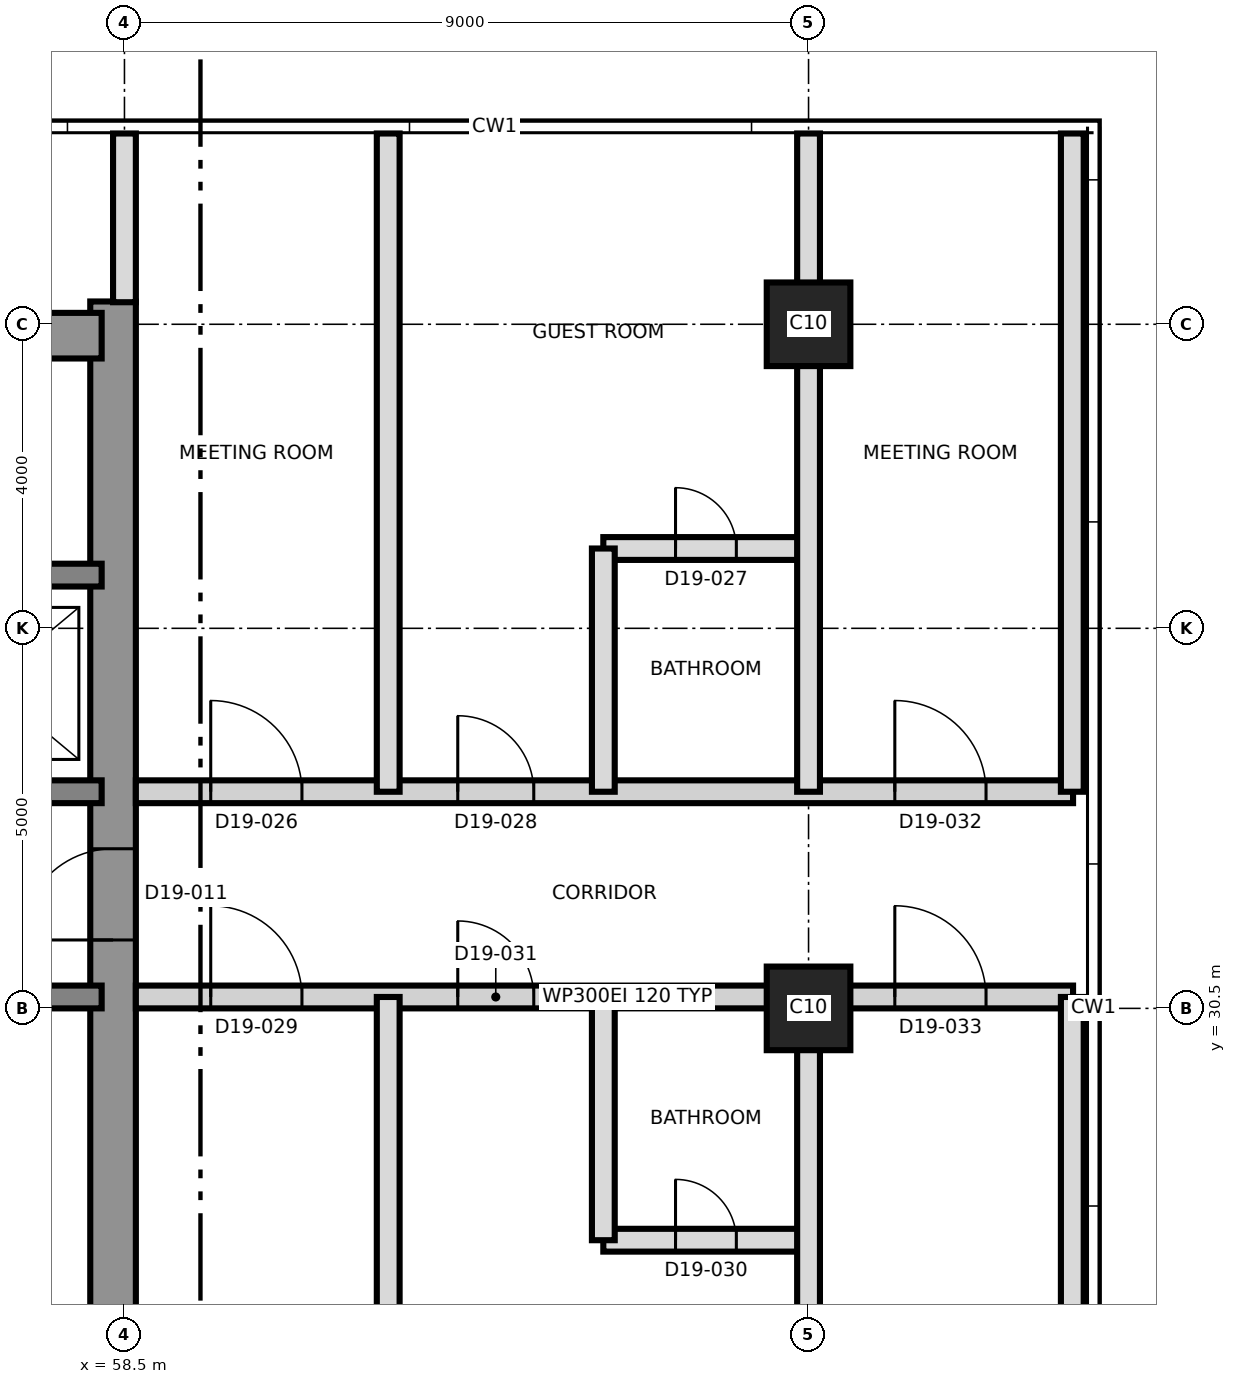
"""IFC4 building model, lengths in metres.
Left out: names, types, materials, properties, quantities, classifications, styles, units other than length and angle.
Written with IfcOpenShell. Run it as: python <this file> out.ifc"""

import sys

from ifc_helpers import new_model, si_unit, direction, frame, frame_2d, origin, origin_2d, place, context, subcontext, project, spatial, rectangle, extrude, element, fill, save


model = new_model("IFC4")
c1 = context("Model", 3, precision=1e-05, world=origin(), true_north=direction((0.0, 1.0)))
c2 = subcontext(c1, "Body", "Model", "MODEL_VIEW")
j1 = project(units=[si_unit("LENGTHUNIT", "METRE"), si_unit("PLANEANGLEUNIT", "RADIAN")], contexts=[c1])
p1 = place(None, origin())
s1 = spatial("IfcSite", under=j1, at=p1, CompositionType="ELEMENT")
p2 = place(p1, origin())
s2 = spatial("IfcBuilding", under=s1, at=p2, CompositionType="ELEMENT")
p3 = place(p2, frame((0.0, 0.0, 179.2)))
s3 = spatial("IfcBuildingStorey", under=s2, at=p3, CompositionType="ELEMENT", Elevation=179.2)
p4 = place(p3, frame((58.35, 21.2, 0.0), z_axis=(0.0, 0.0, 1.0), x_axis=(0.0, 1.0, 0.0)))
e1 = element("IfcWall", 1, at=p4, inside=s3, PredefinedType="SHEAR", context=c2, shape_type="SweptSolid", body=[
    extrude(rectangle(XDim=18.6, YDim=0.6, at=frame_2d((9.3, 0.0))), origin(), (0.0, 0.0, 1.0), 3.7),
])
p5 = place(p4, frame((10.2, 0.0, 0.0)))
e2 = element("IfcOpeningElement", 2, at=p5, cuts=e1, PredefinedType="OPENING", context=c2, shape_type="SweptSolid", body=[
    extrude(rectangle(XDim=1.2, YDim=2.1, at=frame_2d((0.6, 1.05))), frame((0.0, 0.31, 0.0), z_axis=(0.0, -1.0, 0.0), x_axis=(1.0, 0.0, 0.0)), (0.0, 0.0, 1.0), 0.62),
])
p6 = place(p3, frame((31.2, 39.35, 0.0), z_axis=(0.0, 0.0, 1.0), x_axis=(1.0, 0.0, 0.0)))
e3 = element("IfcWall", 3, at=p6, inside=s3, PredefinedType="SHEAR", context=c2, shape_type="SweptSolid", body=[
    extrude(rectangle(XDim=27.0, YDim=0.6, at=frame_2d((13.5, 0.0))), origin(), (0.0, 0.0, 1.0), 3.7),
])
p7 = place(p6, frame((10.5, 0.0, 0.0)))
e4 = element("IfcOpeningElement", 4, at=p7, cuts=e3, PredefinedType="OPENING", context=c2, shape_type="SweptSolid", body=[
    extrude(rectangle(XDim=1.2, YDim=2.1, at=frame_2d((0.6, 1.05))), frame((0.0, 0.31, 0.0), z_axis=(0.0, -1.0, 0.0), x_axis=(1.0, 0.0, 0.0)), (0.0, 0.0, 1.0), 0.62),
])
p8 = place(p3, frame((31.8, 30.65, 0.0), z_axis=(0.0, 0.0, 1.0), x_axis=(1.0, 0.0, 0.0)))
e5 = element("IfcWall", 5, at=p8, inside=s3, PredefinedType="SHEAR", context=c2, shape_type="SweptSolid", body=[
    extrude(rectangle(XDim=26.4, YDim=0.3, at=frame_2d((13.2, 0.0))), origin(), (0.0, 0.0, 1.0), 3.7),
])
p9 = place(p8, frame((24.7, 0.0, 0.0)))
e6 = element("IfcOpeningElement", 6, at=p9, cuts=e5, PredefinedType="OPENING", context=c2, shape_type="SweptSolid", body=[
    extrude(rectangle(XDim=1.0, YDim=2.1, at=frame_2d((0.5, 1.05))), frame((0.0, 0.16, 0.0), z_axis=(0.0, -1.0, 0.0), x_axis=(1.0, 0.0, 0.0)), (0.0, 0.0, 1.0), 0.32),
])
p10 = place(p8, frame((4.0, 0.0, 0.0)))
e7 = element("IfcOpeningElement", 7, at=p10, cuts=e5, PredefinedType="OPENING", context=c2, shape_type="SweptSolid", body=[
    extrude(rectangle(XDim=1.0, YDim=2.1, at=frame_2d((0.5, 1.05))), frame((0.0, 0.16, 0.0), z_axis=(0.0, -1.0, 0.0), x_axis=(1.0, 0.0, 0.0)), (0.0, 0.0, 1.0), 0.32),
])
p11 = place(p3, frame((31.8, 33.35, 0.0), z_axis=(0.0, 0.0, 1.0), x_axis=(1.0, 0.0, 0.0)))
e8 = element("IfcWall", 8, at=p11, inside=s3, PredefinedType="SHEAR", context=c2, shape_type="SweptSolid", body=[
    extrude(rectangle(XDim=26.4, YDim=0.3, at=frame_2d((13.2, 0.0))), origin(), (0.0, 0.0, 1.0), 3.7),
])
p12 = place(p11, frame((13.85, 0.0, 0.0)))
e9 = element("IfcOpeningElement", 9, at=p12, cuts=e8, PredefinedType="OPENING", context=c2, shape_type="SweptSolid", body=[
    extrude(rectangle(XDim=1.4, YDim=2.1, at=frame_2d((0.7, 1.05))), frame((0.0, 0.16, 0.0), z_axis=(0.0, -1.0, 0.0), x_axis=(1.0, 0.0, 0.0)), (0.0, 0.0, 1.0), 0.32),
])
p13 = place(p11, frame((5.325, 0.0, 0.0)))
e10 = element("IfcOpeningElement", 10, at=p13, cuts=e8, PredefinedType="OPENING", context=c2, shape_type="SweptSolid", body=[
    extrude(rectangle(XDim=1.2, YDim=2.1, at=frame_2d((0.6, 1.05))), frame((0.0, 0.16, 0.0), z_axis=(0.0, -1.0, 0.0), x_axis=(1.0, 0.0, 0.0)), (0.0, 0.0, 1.0), 0.32),
])
p14 = place(p11, frame((19.875, 0.0, 0.0)))
e11 = element("IfcOpeningElement", 11, at=p14, cuts=e8, PredefinedType="OPENING", context=c2, shape_type="SweptSolid", body=[
    extrude(rectangle(XDim=1.2, YDim=2.1, at=frame_2d((0.6, 1.05))), frame((0.0, 0.16, 0.0), z_axis=(0.0, -1.0, 0.0), x_axis=(1.0, 0.0, 0.0)), (0.0, 0.0, 1.0), 0.32),
])
p15 = place(p3, frame((43.5, 36.2, 0.0), z_axis=(0.0, 0.0, 1.0), x_axis=(1.0, 0.0, 0.0)))
e12 = element("IfcWall", 12, at=p15, inside=s3, PredefinedType="SHEAR", context=c2, shape_type="SweptSolid", body=[
    extrude(rectangle(XDim=14.7, YDim=0.3, at=frame_2d((7.35, 0.0))), origin(), (0.0, 0.0, 1.0), 3.7),
])
p16 = place(p15, frame((6.9, 0.0, 0.0)))
e13 = element("IfcOpeningElement", 13, at=p16, cuts=e12, PredefinedType="OPENING", context=c2, shape_type="SweptSolid", body=[
    extrude(rectangle(XDim=1.2, YDim=2.1, at=frame_2d((0.6, 1.05))), frame((0.0, 0.16, 0.0), z_axis=(0.0, -1.0, 0.0), x_axis=(1.0, 0.0, 0.0)), (0.0, 0.0, 1.0), 0.32),
])
p17 = place(p15, frame((0.7, 0.0, 0.0)))
e14 = element("IfcOpeningElement", 14, at=p17, cuts=e12, PredefinedType="OPENING", context=c2, shape_type="SweptSolid", body=[
    extrude(rectangle(XDim=1.3, YDim=2.4, at=frame_2d((0.65, 1.2))), frame((0.0, 0.16, 0.0), z_axis=(0.0, -1.0, 0.0), x_axis=(1.0, 0.0, 0.0)), (0.0, 0.0, 1.0), 0.32),
])
p18 = place(p15, frame((3.7, 0.0, 0.0)))
e15 = element("IfcOpeningElement", 15, at=p18, cuts=e12, PredefinedType="OPENING", context=c2, shape_type="SweptSolid", body=[
    extrude(rectangle(XDim=1.3, YDim=2.4, at=frame_2d((0.65, 1.2))), frame((0.0, 0.16, 0.0), z_axis=(0.0, -1.0, 0.0), x_axis=(1.0, 0.0, 0.0)), (0.0, 0.0, 1.0), 0.32),
])
for number, where, z_axis, x_axis in (
    (16, (67.5, 30.5, 0.0), (0.0, 0.0, 1.0), (1.0, 0.0, 0.0)),
    (17, (67.5, 39.5, 0.0), (0.0, 0.0, 1.0), (1.0, 0.0, 0.0)),
):
    element("IfcColumn", number, at=place(p3, frame(where, z_axis=z_axis, x_axis=x_axis)), inside=s3, PredefinedType="COLUMN", context=c2, shape_type="SweptSolid", body=[
        extrude(rectangle(XDim=1.1, YDim=1.1, at=origin_2d()), origin(), (0.0, 0.0, 1.0), 3.7),
    ])
p19 = place(p3, frame((64.8, 27.45, 0.0), z_axis=(0.0, 0.0, 1.0), x_axis=(1.0, 0.0, 0.0)))
e18 = element("IfcWall", 18, at=p19, inside=s3, PredefinedType="PARTITIONING", context=c2, shape_type="SweptSolid", body=[
    extrude(rectangle(XDim=2.7, YDim=0.3, at=frame_2d((1.35, 0.0))), origin(), (0.0, 0.0, 1.0), 3.4),
])
p20 = place(p19, frame((0.95, 0.0, 0.0)))
e19 = element("IfcOpeningElement", 19, at=p20, cuts=e18, PredefinedType="OPENING", context=c2, shape_type="SweptSolid", body=[
    extrude(rectangle(XDim=0.8, YDim=2.1, at=frame_2d((0.4, 1.05))), frame((0.0, 0.16, 0.0), z_axis=(0.0, -1.0, 0.0), x_axis=(1.0, 0.0, 0.0)), (0.0, 0.0, 1.0), 0.32),
])
p21 = place(p3, frame((58.65, 30.65, 0.0), z_axis=(0.0, 0.0, 1.0), x_axis=(1.0, 0.0, 0.0)))
e20 = element("IfcWall", 20, at=p21, inside=s3, PredefinedType="PARTITIONING", context=c2, shape_type="SweptSolid", body=[
    extrude(rectangle(XDim=12.33, YDim=0.3, at=frame_2d((6.165, 0.0))), origin(), (0.0, 0.0, 1.0), 3.4),
])
p22 = place(p21, frame((0.985, 0.0, 0.0)))
e21 = element("IfcOpeningElement", 21, at=p22, cuts=e20, PredefinedType="OPENING", context=c2, shape_type="SweptSolid", body=[
    extrude(rectangle(XDim=1.2, YDim=2.1, at=frame_2d((0.6, 1.05))), frame((0.0, 0.16, 0.0), z_axis=(0.0, -1.0, 0.0), x_axis=(1.0, 0.0, 0.0)), (0.0, 0.0, 1.0), 0.32),
])
p23 = place(p21, frame((4.235, 0.0, 0.0)))
e22 = element("IfcOpeningElement", 22, at=p23, cuts=e20, PredefinedType="OPENING", context=c2, shape_type="SweptSolid", body=[
    extrude(rectangle(XDim=1.0, YDim=2.1, at=frame_2d((0.5, 1.05))), frame((0.0, 0.16, 0.0), z_axis=(0.0, -1.0, 0.0), x_axis=(1.0, 0.0, 0.0)), (0.0, 0.0, 1.0), 0.32),
])
p24 = place(p21, frame((9.985, 0.0, 0.0)))
e23 = element("IfcOpeningElement", 23, at=p24, cuts=e20, PredefinedType="OPENING", context=c2, shape_type="SweptSolid", body=[
    extrude(rectangle(XDim=1.2, YDim=2.1, at=frame_2d((0.6, 1.05))), frame((0.0, 0.16, 0.0), z_axis=(0.0, -1.0, 0.0), x_axis=(1.0, 0.0, 0.0)), (0.0, 0.0, 1.0), 0.32),
])
p25 = place(p3, frame((58.65, 33.35, 0.0), z_axis=(0.0, 0.0, 1.0), x_axis=(1.0, 0.0, 0.0)))
e24 = element("IfcWall", 24, at=p25, inside=s3, PredefinedType="PARTITIONING", context=c2, shape_type="SweptSolid", body=[
    extrude(rectangle(XDim=12.33, YDim=0.3, at=frame_2d((6.165, 0.0))), origin(), (0.0, 0.0, 1.0), 3.4),
])
p26 = place(p25, frame((0.985, 0.0, 0.0)))
e25 = element("IfcOpeningElement", 25, at=p26, cuts=e24, PredefinedType="OPENING", context=c2, shape_type="SweptSolid", body=[
    extrude(rectangle(XDim=1.2, YDim=2.1, at=frame_2d((0.6, 1.05))), frame((0.0, 0.16, 0.0), z_axis=(0.0, -1.0, 0.0), x_axis=(1.0, 0.0, 0.0)), (0.0, 0.0, 1.0), 0.32),
])
p27 = place(p25, frame((4.235, 0.0, 0.0)))
e26 = element("IfcOpeningElement", 26, at=p27, cuts=e24, PredefinedType="OPENING", context=c2, shape_type="SweptSolid", body=[
    extrude(rectangle(XDim=1.0, YDim=2.1, at=frame_2d((0.5, 1.05))), frame((0.0, 0.16, 0.0), z_axis=(0.0, -1.0, 0.0), x_axis=(1.0, 0.0, 0.0)), (0.0, 0.0, 1.0), 0.32),
])
p28 = place(p25, frame((9.985, 0.0, 0.0)))
e27 = element("IfcOpeningElement", 27, at=p28, cuts=e24, PredefinedType="OPENING", context=c2, shape_type="SweptSolid", body=[
    extrude(rectangle(XDim=1.2, YDim=2.1, at=frame_2d((0.6, 1.05))), frame((0.0, 0.16, 0.0), z_axis=(0.0, -1.0, 0.0), x_axis=(1.0, 0.0, 0.0)), (0.0, 0.0, 1.0), 0.32),
])
p29 = place(p3, frame((64.8, 36.55, 0.0), z_axis=(0.0, 0.0, 1.0), x_axis=(1.0, 0.0, 0.0)))
e28 = element("IfcWall", 28, at=p29, inside=s3, PredefinedType="PARTITIONING", context=c2, shape_type="SweptSolid", body=[
    extrude(rectangle(XDim=2.7, YDim=0.3, at=frame_2d((1.35, 0.0))), origin(), (0.0, 0.0, 1.0), 3.4),
])
p30 = place(p29, frame((0.95, 0.0, 0.0)))
e29 = element("IfcOpeningElement", 29, at=p30, cuts=e28, PredefinedType="OPENING", context=c2, shape_type="SweptSolid", body=[
    extrude(rectangle(XDim=0.8, YDim=2.1, at=frame_2d((0.4, 1.05))), frame((0.0, 0.16, 0.0), z_axis=(0.0, -1.0, 0.0), x_axis=(1.0, 0.0, 0.0)), (0.0, 0.0, 1.0), 0.32),
])
p31 = place(p3, frame((58.5, 39.79, 0.0), z_axis=(0.0, 0.0, 1.0), x_axis=(0.0, 1.0, 0.0)))
e30 = element("IfcWall", 30, at=p31, inside=s3, PredefinedType="PARTITIONING", context=c2, shape_type="SweptSolid", body=[
    extrude(rectangle(XDim=2.22, YDim=0.3, at=frame_2d((1.11, 0.0))), origin(), (0.0, 0.0, 1.0), 3.4),
])
p32 = place(p3, frame((61.97, 19.17, 0.0), z_axis=(0.0, 0.0, 1.0), x_axis=(0.0, 1.0, 0.0)))
e31 = element("IfcWall", 31, at=p32, inside=s3, PredefinedType="PARTITIONING", context=c2, shape_type="SweptSolid", body=[
    extrude(rectangle(XDim=11.48, YDim=0.3, at=frame_2d((5.74, 0.0))), origin(), (0.0, 0.0, 1.0), 3.4),
])
p33 = place(p3, frame((61.97, 33.35, 0.0), z_axis=(0.0, 0.0, 1.0), x_axis=(0.0, 1.0, 0.0)))
e32 = element("IfcWall", 32, at=p33, inside=s3, PredefinedType="PARTITIONING", context=c2, shape_type="SweptSolid", body=[
    extrude(rectangle(XDim=8.66, YDim=0.3, at=frame_2d((4.33, 0.0))), origin(), (0.0, 0.0, 1.0), 3.4),
])
for number, where, z_axis, x_axis in (
    (33, (64.8, 27.45, 0.0), (0.0, 0.0, 1.0), (0.0, 1.0, 0.0)),
    (34, (64.8, 33.35, 0.0), (0.0, 0.0, 1.0), (0.0, 1.0, 0.0)),
):
    element("IfcWall", number, at=place(p3, frame(where, z_axis=z_axis, x_axis=x_axis)), inside=s3, PredefinedType="PARTITIONING", context=c2, shape_type="SweptSolid", body=[
        extrude(rectangle(XDim=3.2, YDim=0.3, at=frame_2d((1.6, 0.0))), origin(), (0.0, 0.0, 1.0), 3.4),
    ])
p34 = place(p3, frame((67.5, 19.17, 0.0), z_axis=(0.0, 0.0, 1.0), x_axis=(0.0, 1.0, 0.0)))
e35 = element("IfcWall", 35, at=p34, inside=s3, PredefinedType="PARTITIONING", context=c2, shape_type="SweptSolid", body=[
    extrude(rectangle(XDim=11.48, YDim=0.3, at=frame_2d((5.74, 0.0))), origin(), (0.0, 0.0, 1.0), 3.4),
])
p35 = place(p3, frame((67.5, 33.35, 0.0), z_axis=(0.0, 0.0, 1.0), x_axis=(0.0, 1.0, 0.0)))
e36 = element("IfcWall", 36, at=p35, inside=s3, PredefinedType="PARTITIONING", context=c2, shape_type="SweptSolid", body=[
    extrude(rectangle(XDim=8.66, YDim=0.3, at=frame_2d((4.33, 0.0))), origin(), (0.0, 0.0, 1.0), 3.4),
])
p36 = place(p3, frame((70.97, 19.17, 0.0), z_axis=(0.0, 0.0, 1.0), x_axis=(0.0, 1.0, 0.0)))
e37 = element("IfcWall", 37, at=p36, inside=s3, PredefinedType="PARTITIONING", context=c2, shape_type="SweptSolid", body=[
    extrude(rectangle(XDim=11.48, YDim=0.3, at=frame_2d((5.74, 0.0))), origin(), (0.0, 0.0, 1.0), 3.4),
])
p37 = place(p3, frame((70.97, 33.35, 0.0), z_axis=(0.0, 0.0, 1.0), x_axis=(0.0, 1.0, 0.0)))
e38 = element("IfcWall", 38, at=p37, inside=s3, PredefinedType="PARTITIONING", context=c2, shape_type="SweptSolid", body=[
    extrude(rectangle(XDim=8.66, YDim=0.3, at=frame_2d((4.33, 0.0))), origin(), (0.0, 0.0, 1.0), 3.4),
])
p38 = place(p5, origin())
e39 = element("IfcDoor", 39, at=p38, inside=s3, OperationType="SINGLE_SWING_LEFT", PredefinedType="DOOR", context=c2, shape_type="SweptSolid", body=[
    extrude(rectangle(XDim=1.2, YDim=2.1, at=frame_2d((0.6, 1.05))), frame((0.0, 0.025, 0.0), z_axis=(0.0, -1.0, 0.0), x_axis=(1.0, 0.0, 0.0)), (0.0, 0.0, 1.0), 0.05),
])
fill(e2, e39)
p39 = place(p26, origin())
e40 = element("IfcDoor", 40, at=p39, inside=s3, OperationType="SINGLE_SWING_LEFT", PredefinedType="DOOR", context=c2, shape_type="SweptSolid", body=[
    extrude(rectangle(XDim=1.2, YDim=2.1, at=frame_2d((0.6, 1.05))), frame((0.0, 0.025, 0.0), z_axis=(0.0, -1.0, 0.0), x_axis=(1.0, 0.0, 0.0)), (0.0, 0.0, 1.0), 0.05),
])
fill(e25, e40)
p40 = place(p30, origin())
e41 = element("IfcDoor", 41, at=p40, inside=s3, OperationType="SINGLE_SWING_RIGHT", PredefinedType="DOOR", context=c2, shape_type="SweptSolid", body=[
    extrude(rectangle(XDim=0.8, YDim=2.1, at=frame_2d((0.4, 1.05))), frame((0.0, 0.025, 0.0), z_axis=(0.0, -1.0, 0.0), x_axis=(1.0, 0.0, 0.0)), (0.0, 0.0, 1.0), 0.05),
])
fill(e29, e41)
p41 = place(p27, origin())
e42 = element("IfcDoor", 42, at=p41, inside=s3, OperationType="SINGLE_SWING_LEFT", PredefinedType="DOOR", context=c2, shape_type="SweptSolid", body=[
    extrude(rectangle(XDim=1.0, YDim=2.1, at=frame_2d((0.5, 1.05))), frame((0.0, 0.025, 0.0), z_axis=(0.0, -1.0, 0.0), x_axis=(1.0, 0.0, 0.0)), (0.0, 0.0, 1.0), 0.05),
])
fill(e26, e42)
p42 = place(p22, origin())
e43 = element("IfcDoor", 43, at=p42, inside=s3, OperationType="SINGLE_SWING_LEFT", PredefinedType="DOOR", context=c2, shape_type="SweptSolid", body=[
    extrude(rectangle(XDim=1.2, YDim=2.1, at=frame_2d((0.6, 1.05))), frame((0.0, 0.025, 0.0), z_axis=(0.0, -1.0, 0.0), x_axis=(1.0, 0.0, 0.0)), (0.0, 0.0, 1.0), 0.05),
])
fill(e21, e43)
p43 = place(p20, origin())
e44 = element("IfcDoor", 44, at=p43, inside=s3, OperationType="SINGLE_SWING_RIGHT", PredefinedType="DOOR", context=c2, shape_type="SweptSolid", body=[
    extrude(rectangle(XDim=0.8, YDim=2.1, at=frame_2d((0.4, 1.05))), frame((0.0, 0.025, 0.0), z_axis=(0.0, -1.0, 0.0), x_axis=(1.0, 0.0, 0.0)), (0.0, 0.0, 1.0), 0.05),
])
fill(e19, e44)
p44 = place(p23, origin())
e45 = element("IfcDoor", 45, at=p44, inside=s3, OperationType="SINGLE_SWING_LEFT", PredefinedType="DOOR", context=c2, shape_type="SweptSolid", body=[
    extrude(rectangle(XDim=1.0, YDim=2.1, at=frame_2d((0.5, 1.05))), frame((0.0, 0.025, 0.0), z_axis=(0.0, -1.0, 0.0), x_axis=(1.0, 0.0, 0.0)), (0.0, 0.0, 1.0), 0.05),
])
fill(e22, e45)
p45 = place(p28, origin())
e46 = element("IfcDoor", 46, at=p45, inside=s3, OperationType="SINGLE_SWING_LEFT", PredefinedType="DOOR", context=c2, shape_type="SweptSolid", body=[
    extrude(rectangle(XDim=1.2, YDim=2.1, at=frame_2d((0.6, 1.05))), frame((0.0, 0.025, 0.0), z_axis=(0.0, -1.0, 0.0), x_axis=(1.0, 0.0, 0.0)), (0.0, 0.0, 1.0), 0.05),
])
fill(e27, e46)
p46 = place(p24, origin())
e47 = element("IfcDoor", 47, at=p46, inside=s3, OperationType="SINGLE_SWING_RIGHT", PredefinedType="DOOR", context=c2, shape_type="SweptSolid", body=[
    extrude(rectangle(XDim=1.2, YDim=2.1, at=frame_2d((0.6, 1.05))), frame((0.0, 0.025, 0.0), z_axis=(0.0, -1.0, 0.0), x_axis=(1.0, 0.0, 0.0)), (0.0, 0.0, 1.0), 0.05),
])
fill(e23, e47)
save(model, sys.argv[1])
